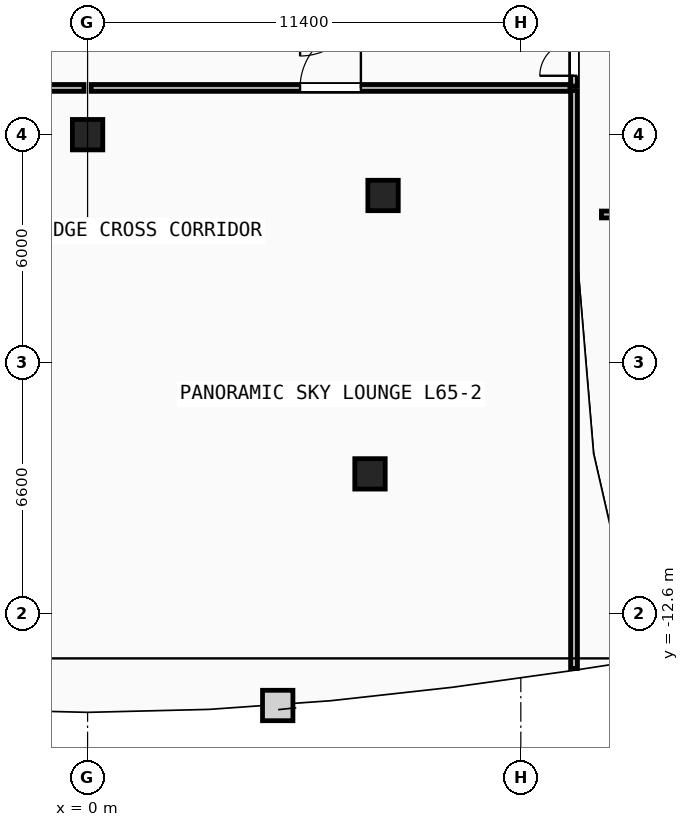
"""IFC4 building model, lengths in metres.
Left out: names, types, materials, properties, quantities, classifications, styles, units other than length and angle.
Written with IfcOpenShell. Run it as: python <this file> out.ifc"""

import sys

from ifc_helpers import new_model, si_unit, direction, frame, frame_2d, origin, origin_2d, place, context, subcontext, project, spatial, rectangle, extrude, element, fill, save


model = new_model("IFC4")
c1 = context("Model", 3, precision=1e-05, world=origin(), true_north=direction((0.0, 1.0)))
c2 = subcontext(c1, "Body", "Model", "MODEL_VIEW")
j1 = project(units=[si_unit("LENGTHUNIT", "METRE"), si_unit("PLANEANGLEUNIT", "RADIAN")], contexts=[c1])
p1 = place(None, origin())
s1 = spatial("IfcSite", under=j1, at=p1, CompositionType="ELEMENT")
p2 = place(p1, origin())
s2 = spatial("IfcBuilding", under=s1, at=p2, CompositionType="ELEMENT")
p3 = place(p2, frame((0.0, 0.0, 246.8)))
s3 = spatial("IfcBuildingStorey", under=s2, at=p3, CompositionType="ELEMENT", Elevation=246.8)
for number, where, z_axis, x_axis in (
    (1, (7.431, -8.925, 0.0), (0.0, 0.0, 1.0), (1.0, 0.0, 0.0)),
    (2, (0.0, 0.0, 0.0), (0.0, 0.0, 1.0), (1.0, 0.0, 0.0)),
    (3, (7.775, -1.6, 0.0), (0.0, 0.0, 1.0), (1.0, 0.0, 0.0)),
):
    element("IfcColumn", number, at=place(p3, frame(where, z_axis=z_axis, x_axis=x_axis)), inside=s3, PredefinedType="COLUMN", context=c2, shape_type="SweptSolid", body=[
        extrude(rectangle(XDim=0.8, YDim=0.8, at=origin_2d()), origin(), (0.0, 0.0, 1.0), 3.6),
    ])
p4 = place(p3, frame((13.521, -2.1, 0.0), z_axis=(0.0, 0.0, 1.0), x_axis=(1.0, 0.0, 0.0)))
e4 = element("IfcWall", 4, at=p4, inside=s3, PredefinedType="PARTITIONING", context=c2, shape_type="SweptSolid", body=[
    extrude(rectangle(XDim=7.398, YDim=0.18, at=frame_2d((3.699, 0.0))), origin(), (0.0, 0.0, 1.0), 3.34),
])
p5 = place(p3, frame((-12.688, 1.23, 0.0), z_axis=(0.0, 0.0, 1.0), x_axis=(1.0, 0.0, 0.0)))
e5 = element("IfcWall", 5, at=p5, inside=s3, PredefinedType="PARTITIONING", context=c2, shape_type="SweptSolid", body=[
    extrude(rectangle(XDim=12.594, YDim=0.18, at=frame_2d((6.297, 0.0))), origin(), (0.0, 0.0, 1.0), 2.663),
])
p6 = place(p5, frame((5.497, 0.0, 0.0)))
e6 = element("IfcOpeningElement", 6, at=p6, cuts=e5, PredefinedType="OPENING", context=c2, shape_type="SweptSolid", body=[
    extrude(rectangle(XDim=1.6, YDim=2.2, at=frame_2d((0.8, 1.1))), frame((0.0, 0.1, 0.0), z_axis=(0.0, -1.0, 0.0), x_axis=(1.0, 0.0, 0.0)), (0.0, 0.0, 1.0), 0.2),
])
p7 = place(p3, frame((0.095, 1.23, 0.0), z_axis=(0.0, 0.0, 1.0), x_axis=(1.0, 0.0, 0.0)))
e7 = element("IfcWall", 7, at=p7, inside=s3, PredefinedType="PARTITIONING", context=c2, shape_type="SweptSolid", body=[
    extrude(rectangle(XDim=12.594, YDim=0.18, at=frame_2d((6.297, 0.0))), origin(), (0.0, 0.0, 1.0), 3.34),
])
p8 = place(p7, frame((5.497, 0.0, 0.0)))
e8 = element("IfcOpeningElement", 8, at=p8, cuts=e7, PredefinedType="OPENING", context=c2, shape_type="SweptSolid", body=[
    extrude(rectangle(XDim=1.6, YDim=2.2, at=frame_2d((0.8, 1.1))), frame((0.0, 0.1, 0.0), z_axis=(0.0, -1.0, 0.0), x_axis=(1.0, 0.0, 0.0)), (0.0, 0.0, 1.0), 0.2),
])
p9 = place(p3, frame((12.8, -14.044, 0.0), z_axis=(0.0, 0.0, 1.0), x_axis=(0.0, 1.0, 0.0)))
e9 = element("IfcWall", 9, at=p9, inside=s3, PredefinedType="PARTITIONING", context=c2, shape_type="SweptSolid", body=[
    extrude(rectangle(XDim=15.204, YDim=0.18, at=frame_2d((7.602, 0.0))), origin(), (0.0, 0.0, 1.0), 3.34),
])
p10 = place(p3, frame((12.8, 1.28, 0.0), z_axis=(0.0, 0.0, 1.0), x_axis=(0.0, 1.0, 0.0)))
e10 = element("IfcWall", 10, at=p10, inside=s3, PredefinedType="PARTITIONING", context=c2, shape_type="SweptSolid", body=[
    extrude(rectangle(XDim=2.34, YDim=0.18, at=frame_2d((1.17, 0.0))), origin(), (0.0, 0.0, 1.0), 3.34),
])
p11 = place(p10, frame((0.27, 0.0, 0.0)))
e11 = element("IfcOpeningElement", 11, at=p11, cuts=e10, PredefinedType="OPENING", context=c2, shape_type="SweptSolid", body=[
    extrude(rectangle(XDim=1.8, YDim=2.25, at=frame_2d((0.9, 1.125))), frame((0.0, 0.1, 0.0), z_axis=(0.0, -1.0, 0.0), x_axis=(1.0, 0.0, 0.0)), (0.0, 0.0, 1.0), 0.2),
])
p12 = place(p8, origin())
e12 = element("IfcDoor", 12, at=p12, inside=s3, OperationType="SINGLE_SWING_RIGHT", PredefinedType="DOOR", context=c2, shape_type="SweptSolid", body=[
    extrude(rectangle(XDim=1.6, YDim=2.2, at=frame_2d((0.8, 1.1))), frame((0.0, 0.025, 0.0), z_axis=(0.0, -1.0, 0.0), x_axis=(1.0, 0.0, 0.0)), (0.0, 0.0, 1.0), 0.05),
])
fill(e8, e12)
p13 = place(p11, origin())
e13 = element("IfcDoor", 13, at=p13, inside=s3, OperationType="DOUBLE_DOOR_SINGLE_SWING", PredefinedType="DOOR", context=c2, shape_type="SweptSolid", body=[
    extrude(rectangle(XDim=1.8, YDim=2.25, at=frame_2d((0.9, 1.125))), frame((0.0, 0.025, 0.0), z_axis=(0.0, -1.0, 0.0), x_axis=(1.0, 0.0, 0.0)), (0.0, 0.0, 1.0), 0.05),
])
fill(e11, e13)
save(model, sys.argv[1])
